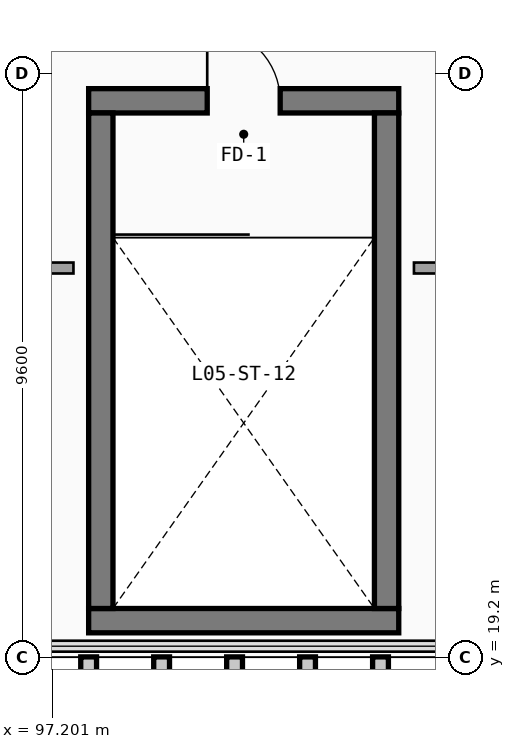
"""IFC4 building model, lengths in metres.
Left out: names, types, materials, properties, quantities, classifications, styles, units other than length and angle.
Written with IfcOpenShell. Run it as: python <this file> out.ifc"""

import sys

from ifc_helpers import new_model, si_unit, direction, frame, frame_2d, origin, place, context, subcontext, project, spatial, rectangle, extrude, element, fill, save


model = new_model("IFC4")
c1 = context("Model", 3, precision=1e-05, world=origin(), true_north=direction((0.0, 1.0)))
c2 = subcontext(c1, "Body", "Model", "MODEL_VIEW")
j1 = project(units=[si_unit("LENGTHUNIT", "METRE"), si_unit("PLANEANGLEUNIT", "RADIAN")], contexts=[c1])
p1 = place(None, origin())
s1 = spatial("IfcSite", under=j1, at=p1, CompositionType="ELEMENT")
p2 = place(p1, origin())
s2 = spatial("IfcBuilding", under=s1, at=p2, CompositionType="ELEMENT")
p3 = place(p2, frame((0.0, 0.0, 23.1)))
s3 = spatial("IfcBuildingStorey", under=s2, at=p3, CompositionType="ELEMENT", Elevation=23.1)
p4 = place(p3, frame((97.8, 19.8, 0.0), z_axis=(0.0, 0.0, 1.0), x_axis=(1.0, 0.0, 0.0)))
e1 = element("IfcWall", 1, at=p4, inside=s3, PredefinedType="SHEAR", context=c2, shape_type="SweptSolid", body=[
    extrude(rectangle(XDim=5.1, YDim=0.4, at=frame_2d((2.55, 0.0))), origin(), (0.0, 0.0, 1.0), 4.82),
])
p5 = place(p3, frame((102.9, 28.35, 0.0), z_axis=(0.0, 0.0, 1.0), x_axis=(-1.0, 0.0, 0.0)))
e2 = element("IfcWall", 2, at=p5, inside=s3, PredefinedType="SHEAR", context=c2, shape_type="SweptSolid", body=[
    extrude(rectangle(XDim=5.1, YDim=0.4, at=frame_2d((2.55, 0.0))), origin(), (0.0, 0.0, 1.0), 4.82),
])
p6 = place(p5, frame((3.15, 0.0, 0.0), z_axis=(0.0, 0.0, 1.0), x_axis=(-1.0, 0.0, 0.0)))
e3 = element("IfcOpeningElement", 3, at=p6, cuts=e2, PredefinedType="OPENING", context=c2, shape_type="SweptSolid", body=[
    extrude(rectangle(XDim=1.2, YDim=2.2, at=frame_2d((0.6, 1.1))), frame((0.0, 0.21, 0.0), z_axis=(0.0, -1.0, 0.0), x_axis=(1.0, 0.0, 0.0)), (0.0, 0.0, 1.0), 0.42),
])
for number, where, z_axis, x_axis in (
    (4, (98.0, 28.15, 0.0), (0.0, 0.0, 1.0), (0.0, -1.0, 0.0)),
    (5, (102.7, 20.0, 0.0), (0.0, 0.0, 1.0), (0.0, 1.0, 0.0)),
):
    element("IfcWall", number, at=place(p3, frame(where, z_axis=z_axis, x_axis=x_axis)), inside=s3, PredefinedType="SHEAR", context=c2, shape_type="SweptSolid", body=[
        extrude(rectangle(XDim=8.15, YDim=0.4, at=frame_2d((4.075, 0.0))), origin(), (0.0, 0.0, 1.0), 4.82),
    ])
p7 = place(p3, frame((106.82, 25.6, 0.0), z_axis=(0.0, 0.0, 1.0), x_axis=(-1.0, 0.0, 0.0)))
e6 = element("IfcWall", 6, at=p7, inside=s3, PredefinedType="PARTITIONING", context=c2, shape_type="SweptSolid", body=[
    extrude(rectangle(XDim=3.67, YDim=0.18, at=frame_2d((1.835, 0.0))), origin(), (0.0, 0.0, 1.0), 4.82),
])
p8 = place(p3, frame((97.55, 25.6, 0.0), z_axis=(0.0, 0.0, 1.0), x_axis=(-1.0, 0.0, 0.0)))
e7 = element("IfcWall", 7, at=p8, inside=s3, PredefinedType="PARTITIONING", context=c2, shape_type="SweptSolid", body=[
    extrude(rectangle(XDim=5.17, YDim=0.18, at=frame_2d((2.585, 0.0))), origin(), (0.0, 0.0, 1.0), 4.82),
])
p9 = place(p6, origin())
e8 = element("IfcDoor", 8, at=p9, inside=s3, OperationType="SINGLE_SWING_LEFT", PredefinedType="DOOR", context=c2, shape_type="SweptSolid", body=[
    extrude(rectangle(XDim=1.2, YDim=2.2, at=frame_2d((0.6, 1.1))), frame((0.0, 0.025, 0.0), z_axis=(0.0, -1.0, 0.0), x_axis=(1.0, 0.0, 0.0)), (0.0, 0.0, 1.0), 0.05),
])
fill(e3, e8)
save(model, sys.argv[1])
